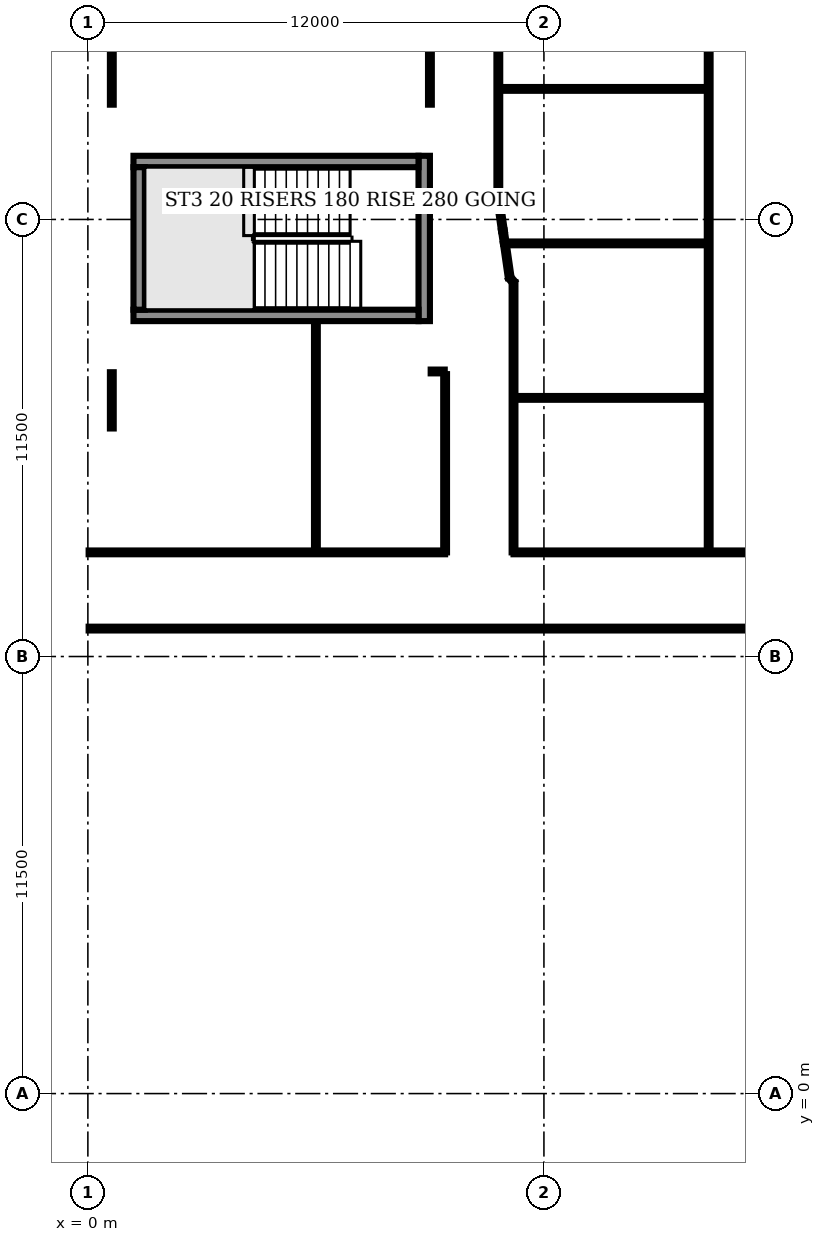
"""IFC4 building model, lengths in metres.
Left out: names, types, materials, properties, quantities, classifications, styles, units other than length and angle.
Written with IfcOpenShell. Run it as: python <this file> out.ifc"""

import sys

from ifc_helpers import new_model, si_unit, direction, frame, frame_2d, origin, origin_2d, place, context, subcontext, project, spatial, rectangle, i_section, extrude, element, fill, save


model = new_model("IFC4")
c1 = context("Model", 3, precision=1e-05, world=origin(), true_north=direction((0.0, 1.0)))
c2 = subcontext(c1, "Body", "Model", "MODEL_VIEW")
j1 = project(units=[si_unit("LENGTHUNIT", "METRE"), si_unit("PLANEANGLEUNIT", "RADIAN")], contexts=[c1])
p1 = place(None, origin())
s1 = spatial("IfcSite", under=j1, at=p1, CompositionType="ELEMENT")
p2 = place(p1, origin())
s2 = spatial("IfcBuilding", under=s1, at=p2, CompositionType="ELEMENT")
p3 = place(p2, frame((0.0, 0.0, 41.5)))
s3 = spatial("IfcBuildingStorey", under=s2, at=p3, CompositionType="ELEMENT", Elevation=41.5)
p4 = place(p3, frame((7.1, 7.1, 0.0), z_axis=(0.0, 0.0, 1.0), x_axis=(1.0, 0.0, 0.0)))
e1 = element("IfcColumn", 1, at=p4, inside=s3, PredefinedType="COLUMN", context=c2, shape_type="SweptSolid", body=[
    extrude(rectangle(XDim=2.2, YDim=2.2, at=origin_2d()), origin(), (0.0, 0.0, 1.0), 3.6),
])
for number, where, z_axis, x_axis in (
    (2, (6.694, 0.529, 0.0), (0.0, 0.0, 1.0), (-0.087, -0.996, 0.0)),
    (3, (0.66, 18.0, 0.0), (0.0, 0.0, 1.0), (-1.0, 0.0, 0.0)),
    (4, (2.332, 6.667, 0.0), (0.0, 0.0, 1.0), (-1.0, 0.0, 0.0)),
):
    element("IfcColumn", number, at=place(p3, frame(where, z_axis=z_axis, x_axis=x_axis)), inside=s3, PredefinedType="COLUMN", context=c2, shape_type="SweptSolid", body=[
        extrude(i_section(OverallWidth=0.302, OverallDepth=1.008, WebThickness=0.021, FlangeThickness=0.04, FilletRadius=0.03, at=origin_2d()), origin(), (0.0, 0.0, 1.0), 3.6),
    ])
for number, where, z_axis, x_axis in (
    (5, (12.0, 11.5, 0.0), (0.0, 0.0, 1.0), (1.0, 0.0, 0.0)),
    (6, (12.0, 23.0, 0.0), (0.0, 0.0, 1.0), (1.0, 0.0, 0.0)),
):
    element("IfcColumn", number, at=place(p3, frame(where, z_axis=z_axis, x_axis=x_axis)), inside=s3, PredefinedType="COLUMN", context=c2, shape_type="SweptSolid", body=[
        extrude(i_section(OverallWidth=0.305, OverallDepth=0.62, WebThickness=0.021, FlangeThickness=0.04, FilletRadius=0.027, at=origin_2d()), origin(), (0.0, 0.0, 1.0), 3.6),
    ])
p5 = place(p3, frame((5.835, -0.516, 0.0), z_axis=(0.0, 0.0, 1.0), x_axis=(0.996195, -0.087152, 0.0)))
e7 = element("IfcWall", 7, at=p5, inside=s3, PredefinedType="SOLIDWALL", context=c2, shape_type="SweptSolid", body=[
    extrude(rectangle(XDim=40.333, YDim=0.35, at=frame_2d((20.167, 0.0))), origin(), (0.0, 0.0, 1.0), 1.0),
])
p6 = place(p3, frame((-0.005, 41.83, 0.0), z_axis=(0.0, 0.0, 1.0), x_axis=(0.0, -1.0, 0.0)))
e8 = element("IfcWall", 8, at=p6, inside=s3, PredefinedType="SOLIDWALL", context=c2, shape_type="SweptSolid", body=[
    extrude(rectangle(XDim=36.01, YDim=0.35, at=frame_2d((18.005, 0.0))), origin(), (0.0, 0.0, 1.0), 1.0),
])
p7 = place(p3, frame((0.17, 5.995, 0.0), z_axis=(0.0, 0.0, 1.0), x_axis=(1.0, 0.0, 0.0)))
e9 = element("IfcWall", 9, at=p7, inside=s3, PredefinedType="SOLIDWALL", context=c2, shape_type="SweptSolid", body=[
    extrude(rectangle(XDim=2.011, YDim=0.35, at=frame_2d((1.005, 0.0))), origin(), (0.0, 0.0, 1.0), 1.0),
])
p8 = place(p3, frame((2.483, 5.995, 0.0), z_axis=(0.0, 0.0, 1.0), x_axis=(1.0, 0.0, 0.0)))
e10 = element("IfcWall", 10, at=p8, inside=s3, PredefinedType="SOLIDWALL", context=c2, shape_type="SweptSolid", body=[
    extrude(rectangle(XDim=3.517, YDim=0.35, at=frame_2d((1.759, 0.0))), origin(), (0.0, 0.0, 1.0), 1.0),
])
p9 = place(p3, frame((5.995, 5.82, 0.0), z_axis=(0.0, 0.0, 1.0), x_axis=(0.0, -1.0, 0.0)))
e11 = element("IfcWall", 11, at=p9, inside=s3, PredefinedType="SOLIDWALL", context=c2, shape_type="SweptSolid", body=[
    extrude(rectangle(XDim=6.161, YDim=0.35, at=frame_2d((3.081, 0.0))), origin(), (0.0, 0.0, 1.0), 1.0),
])
p10 = place(p3, frame((8.85, 20.325, 0.0), z_axis=(0.0, 0.0, 1.0), x_axis=(0.0, 1.0, 0.0)))
e12 = element("IfcWall", 12, at=p10, inside=s3, PredefinedType="SHEAR", context=c2, shape_type="SweptSolid", body=[
    extrude(rectangle(XDim=4.35, YDim=0.3, at=frame_2d((2.175, 0.0))), origin(), (0.0, 0.0, 1.0), 3.2),
])
p11 = place(p10, frame((1.575, 0.0, 0.0)))
e13 = element("IfcOpeningElement", 13, at=p11, cuts=e12, PredefinedType="OPENING", context=c2, shape_type="SweptSolid", body=[
    extrude(rectangle(XDim=1.2, YDim=2.1, at=frame_2d((0.6, 1.05))), frame((0.0, 0.16, 0.0), z_axis=(0.0, -1.0, 0.0), x_axis=(1.0, 0.0, 0.0)), (0.0, 0.0, 1.0), 0.32),
])
p12 = place(p3, frame((0.02, 12.235, 0.0), z_axis=(0.0, 0.0, 1.0), x_axis=(1.0, 0.0, 0.0)))
e14 = element("IfcWall", 14, at=p12, inside=s3, PredefinedType="PARTITIONING", context=c2, shape_type="SweptSolid", body=[
    extrude(rectangle(XDim=38.46, YDim=0.1, at=frame_2d((19.23, 0.0))), origin(), (0.0, 0.0, 1.0), 3.2),
])
p13 = place(p12, frame((2.405, 0.0, 0.0)))
e15 = element("IfcOpeningElement", 15, at=p13, cuts=e14, PredefinedType="OPENING", context=c2, shape_type="SweptSolid", body=[
    extrude(rectangle(XDim=1.0, YDim=2.1, at=frame_2d((0.5, 1.05))), frame((0.0, 0.06, 0.0), z_axis=(0.0, -1.0, 0.0), x_axis=(1.0, 0.0, 0.0)), (0.0, 0.0, 1.0), 0.12),
])
p14 = place(p12, frame((7.405, 0.0, 0.0)))
e16 = element("IfcOpeningElement", 16, at=p14, cuts=e14, PredefinedType="OPENING", context=c2, shape_type="SweptSolid", body=[
    extrude(rectangle(XDim=1.0, YDim=2.1, at=frame_2d((0.5, 1.05))), frame((0.0, 0.06, 0.0), z_axis=(0.0, -1.0, 0.0), x_axis=(1.0, 0.0, 0.0)), (0.0, 0.0, 1.0), 0.12),
])
p15 = place(p12, frame((13.405, 0.0, 0.0)))
e17 = element("IfcOpeningElement", 17, at=p15, cuts=e14, PredefinedType="OPENING", context=c2, shape_type="SweptSolid", body=[
    extrude(rectangle(XDim=1.0, YDim=2.1, at=frame_2d((0.5, 1.05))), frame((0.0, 0.06, 0.0), z_axis=(0.0, -1.0, 0.0), x_axis=(1.0, 0.0, 0.0)), (0.0, 0.0, 1.0), 0.12),
])
p16 = place(p12, frame((19.48, 0.0, 0.0)))
e18 = element("IfcOpeningElement", 18, at=p16, cuts=e14, PredefinedType="OPENING", context=c2, shape_type="SweptSolid", body=[
    extrude(rectangle(XDim=1.0, YDim=2.1, at=frame_2d((0.5, 1.05))), frame((0.0, 0.06, 0.0), z_axis=(0.0, -1.0, 0.0), x_axis=(1.0, 0.0, 0.0)), (0.0, 0.0, 1.0), 0.12),
])
p17 = place(p12, frame((22.205, 0.0, 0.0)))
e19 = element("IfcOpeningElement", 19, at=p17, cuts=e14, PredefinedType="OPENING", context=c2, shape_type="SweptSolid", body=[
    extrude(rectangle(XDim=1.0, YDim=2.1, at=frame_2d((0.5, 1.05))), frame((0.0, 0.06, 0.0), z_axis=(0.0, -1.0, 0.0), x_axis=(1.0, 0.0, 0.0)), (0.0, 0.0, 1.0), 0.12),
])
p18 = place(p12, frame((34.2, 0.0, 0.0)))
e20 = element("IfcOpeningElement", 20, at=p18, cuts=e14, PredefinedType="OPENING", context=c2, shape_type="SweptSolid", body=[
    extrude(rectangle(XDim=1.0, YDim=2.1, at=frame_2d((0.5, 1.05))), frame((0.0, 0.06, 0.0), z_axis=(0.0, -1.0, 0.0), x_axis=(1.0, 0.0, 0.0)), (0.0, 0.0, 1.0), 0.12),
])
p19 = place(p3, frame((0.02, 14.24, 0.0), z_axis=(0.0, 0.0, 1.0), x_axis=(1.0, 0.0, 0.0)))
e21 = element("IfcWall", 21, at=p19, inside=s3, PredefinedType="PARTITIONING", context=c2, shape_type="SweptSolid", body=[
    extrude(rectangle(XDim=9.38, YDim=0.1, at=frame_2d((4.69, 0.0))), origin(), (0.0, 0.0, 1.0), 3.2),
])
p20 = place(p19, frame((2.56, 0.0, 0.0)))
e22 = element("IfcOpeningElement", 22, at=p20, cuts=e21, PredefinedType="OPENING", context=c2, shape_type="SweptSolid", body=[
    extrude(rectangle(XDim=1.0, YDim=2.1, at=frame_2d((0.5, 1.05))), frame((0.0, 0.06, 0.0), z_axis=(0.0, -1.0, 0.0), x_axis=(1.0, 0.0, 0.0)), (0.0, 0.0, 1.0), 0.12),
])
p21 = place(p3, frame((0.63, 17.5, 0.0), z_axis=(0.0, 0.0, 1.0), x_axis=(0.0, 1.0, 0.0)))
e23 = element("IfcWall", 23, at=p21, inside=s3, PredefinedType="PARTITIONING", context=c2, shape_type="SweptSolid", body=[
    extrude(rectangle(XDim=1.48, YDim=0.1, at=frame_2d((0.74, 0.0))), origin(), (0.0, 0.0, 1.0), 2.58),
])
p22 = place(p3, frame((0.63, 26.02, 0.0), z_axis=(0.0, 0.0, 1.0), x_axis=(0.0, 1.0, 0.0)))
e24 = element("IfcWall", 24, at=p22, inside=s3, PredefinedType="PARTITIONING", context=c2, shape_type="SweptSolid", body=[
    extrude(rectangle(XDim=3.98, YDim=0.1, at=frame_2d((1.99, 0.0))), origin(), (0.0, 0.0, 1.0), 2.58),
])
p23 = place(p3, frame((6.0, 8.21, 0.0), z_axis=(0.0, 0.0, 1.0), x_axis=(0.0, 1.0, 0.0)))
e25 = element("IfcWall", 25, at=p23, inside=s3, PredefinedType="PARTITIONING", context=c2, shape_type="SweptSolid", body=[
    extrude(rectangle(XDim=4.025, YDim=0.1, at=frame_2d((2.013, 0.0))), origin(), (0.0, 0.0, 1.0), 3.2),
])
p24 = place(p3, frame((6.0, 14.24, 0.0), z_axis=(0.0, 0.0, 1.0), x_axis=(0.0, 1.0, 0.0)))
e26 = element("IfcWall", 26, at=p24, inside=s3, PredefinedType="PARTITIONING", context=c2, shape_type="SweptSolid", body=[
    extrude(rectangle(XDim=6.085, YDim=0.1, at=frame_2d((3.042, 0.0))), origin(), (0.0, 0.0, 1.0), 3.2),
])
p25 = place(p3, frame((9.0, 26.02, 0.0), z_axis=(0.0, 0.0, 1.0), x_axis=(0.0, 1.0, 0.0)))
e27 = element("IfcWall", 27, at=p25, inside=s3, PredefinedType="PARTITIONING", context=c2, shape_type="SweptSolid", body=[
    extrude(rectangle(XDim=7.96, YDim=0.1, at=frame_2d((3.98, 0.0))), origin(), (0.0, 0.0, 1.0), 3.2),
])
p26 = place(p25, frame((3.56, 0.0, 0.0)))
e28 = element("IfcOpeningElement", 28, at=p26, cuts=e27, PredefinedType="OPENING", context=c2, shape_type="SweptSolid", body=[
    extrude(rectangle(XDim=1.0, YDim=2.1, at=frame_2d((0.5, 1.05))), frame((0.0, 0.06, 0.0), z_axis=(0.0, -1.0, 0.0), x_axis=(1.0, 0.0, 0.0)), (0.0, 0.0, 1.0), 0.12),
])
p27 = place(p3, frame((9.02, 19.0, 0.0), z_axis=(0.0, 0.0, 1.0), x_axis=(1.0, 0.0, 0.0)))
e29 = element("IfcWall", 29, at=p27, inside=s3, PredefinedType="PARTITIONING", context=c2, shape_type="SweptSolid", body=[
    extrude(rectangle(XDim=0.37, YDim=0.1, at=frame_2d((0.185, 0.0))), origin(), (0.0, 0.0, 1.0), 3.2),
])
p28 = place(p3, frame((9.4, 14.24, 0.0), z_axis=(0.0, 0.0, 1.0), x_axis=(0.0, 1.0, 0.0)))
e30 = element("IfcWall", 30, at=p28, inside=s3, PredefinedType="PARTITIONING", context=c2, shape_type="SweptSolid", body=[
    extrude(rectangle(XDim=4.69, YDim=0.1, at=frame_2d((2.345, 0.0))), origin(), (0.0, 0.0, 1.0), 3.2),
])
p29 = place(p28, frame((0.14, 0.0, 0.0)))
e31 = element("IfcOpeningElement", 31, at=p29, cuts=e30, PredefinedType="OPENING", context=c2, shape_type="SweptSolid", body=[
    extrude(rectangle(XDim=1.0, YDim=2.1, at=frame_2d((0.5, 1.05))), frame((0.0, 0.06, 0.0), z_axis=(0.0, -1.0, 0.0), x_axis=(1.0, 0.0, 0.0)), (0.0, 0.0, 1.0), 0.12),
])
p30 = place(p3, frame((10.0, -0.855, 0.0), z_axis=(0.0, 0.0, 1.0), x_axis=(0.0, 1.0, 0.0)))
e32 = element("IfcWall", 32, at=p30, inside=s3, PredefinedType="PARTITIONING", context=c2, shape_type="SweptSolid", body=[
    extrude(rectangle(XDim=13.09, YDim=0.1, at=frame_2d((6.545, 0.0))), origin(), (0.0, 0.0, 1.0), 3.2),
])
p31 = place(p3, frame((10.8, 23.55, 0.0), z_axis=(0.0, 0.0, 1.0), x_axis=(0.0, 1.0, 0.0)))
e33 = element("IfcWall", 33, at=p31, inside=s3, PredefinedType="PARTITIONING", context=c2, shape_type="SweptSolid", body=[
    extrude(rectangle(XDim=6.95, YDim=0.1, at=frame_2d((3.475, 0.0))), origin(), (0.0, 0.0, 1.0), 3.2),
])
p32 = place(p31, frame((0.308, 0.0, 0.0)))
e34 = element("IfcOpeningElement", 34, at=p32, cuts=e33, PredefinedType="OPENING", context=c2, shape_type="SweptSolid", body=[
    extrude(rectangle(XDim=1.0, YDim=2.1, at=frame_2d((0.5, 1.05))), frame((0.0, 0.06, 0.0), z_axis=(0.0, -1.0, 0.0), x_axis=(1.0, 0.0, 0.0)), (0.0, 0.0, 1.0), 0.12),
])
p33 = place(p3, frame((10.8, 26.435, 0.0), z_axis=(0.0, 0.0, 1.0), x_axis=(1.0, 0.0, 0.0)))
e35 = element("IfcWall", 35, at=p33, inside=s3, PredefinedType="PARTITIONING", context=c2, shape_type="SweptSolid", body=[
    extrude(rectangle(XDim=5.535, YDim=0.1, at=frame_2d((2.768, 0.0))), origin(), (0.0, 0.0, 1.0), 3.2),
])
p34 = place(p3, frame((10.92, 22.705, 0.0), z_axis=(0.0, 0.0, 1.0), x_axis=(-0.14046, 0.990086, 0.0)))
e36 = element("IfcWall", 36, at=p34, inside=s3, PredefinedType="PARTITIONING", context=c2, shape_type="SweptSolid", body=[
    extrude(rectangle(XDim=0.854, YDim=0.1, at=frame_2d((0.427, 0.0))), origin(), (0.0, 0.0, 1.0), 3.2),
])
p35 = place(p3, frame((10.97, 22.37, 0.0), z_axis=(0.0, 0.0, 1.0), x_axis=(-0.147776, 0.989018, 0.0)))
e37 = element("IfcWall", 37, at=p35, inside=s3, PredefinedType="PARTITIONING", context=c2, shape_type="SweptSolid", body=[
    extrude(rectangle(XDim=0.339, YDim=0.1, at=frame_2d((0.169, 0.0))), origin(), (0.0, 0.0, 1.0), 3.2),
])
p36 = place(p3, frame((10.97, 22.37, 0.0), z_axis=(0.0, 0.0, 1.0), x_axis=(1.0, 0.0, 0.0)))
e38 = element("IfcWall", 38, at=p36, inside=s3, PredefinedType="PARTITIONING", context=c2, shape_type="SweptSolid", body=[
    extrude(rectangle(XDim=5.365, YDim=0.1, at=frame_2d((2.683, 0.0))), origin(), (0.0, 0.0, 1.0), 3.2),
])
p37 = place(p3, frame((11.1, 21.465, 0.0), z_axis=(0.0, 0.0, 1.0), x_axis=(-0.142318, 0.989818, 0.0)))
e39 = element("IfcWall", 39, at=p37, inside=s3, PredefinedType="PARTITIONING", context=c2, shape_type="SweptSolid", body=[
    extrude(rectangle(XDim=0.914, YDim=0.1, at=frame_2d((0.457, 0.0))), origin(), (0.0, 0.0, 1.0), 3.2),
])
p38 = place(p3, frame((11.2, 14.24, 0.0), z_axis=(0.0, 0.0, 1.0), x_axis=(0.0, 1.0, 0.0)))
e40 = element("IfcWall", 40, at=p38, inside=s3, PredefinedType="PARTITIONING", context=c2, shape_type="SweptSolid", body=[
    extrude(rectangle(XDim=7.11, YDim=0.1, at=frame_2d((3.555, 0.0))), origin(), (0.0, 0.0, 1.0), 3.2),
])
p39 = place(p38, frame((5.085, 0.0, 0.0)))
e41 = element("IfcOpeningElement", 41, at=p39, cuts=e40, PredefinedType="OPENING", context=c2, shape_type="SweptSolid", body=[
    extrude(rectangle(XDim=1.0, YDim=2.1, at=frame_2d((0.5, 1.05))), frame((0.0, 0.06, 0.0), z_axis=(0.0, -1.0, 0.0), x_axis=(1.0, 0.0, 0.0)), (0.0, 0.0, 1.0), 0.12),
])
p40 = place(p3, frame((11.2, 14.24, 0.0), z_axis=(0.0, 0.0, 1.0), x_axis=(1.0, 0.0, 0.0)))
e42 = element("IfcWall", 42, at=p40, inside=s3, PredefinedType="PARTITIONING", context=c2, shape_type="SweptSolid", body=[
    extrude(rectangle(XDim=51.635, YDim=0.1, at=frame_2d((25.817, 0.0))), origin(), (0.0, 0.0, 1.0), 3.2),
])
p41 = place(p40, frame((0.115, 0.0, 0.0)))
e43 = element("IfcOpeningElement", 43, at=p41, cuts=e42, PredefinedType="OPENING", context=c2, shape_type="SweptSolid", body=[
    extrude(rectangle(XDim=1.0, YDim=2.1, at=frame_2d((0.5, 1.05))), frame((0.0, 0.06, 0.0), z_axis=(0.0, -1.0, 0.0), x_axis=(1.0, 0.0, 0.0)), (0.0, 0.0, 1.0), 0.12),
])
p42 = place(p40, frame((6.635, 0.0, 0.0)))
e44 = element("IfcOpeningElement", 44, at=p42, cuts=e42, PredefinedType="OPENING", context=c2, shape_type="SweptSolid", body=[
    extrude(rectangle(XDim=1.0, YDim=2.1, at=frame_2d((0.5, 1.05))), frame((0.0, 0.06, 0.0), z_axis=(0.0, -1.0, 0.0), x_axis=(1.0, 0.0, 0.0)), (0.0, 0.0, 1.0), 0.12),
])
p43 = place(p40, frame((22.7, 0.0, 0.0)))
e45 = element("IfcOpeningElement", 45, at=p43, cuts=e42, PredefinedType="OPENING", context=c2, shape_type="SweptSolid", body=[
    extrude(rectangle(XDim=1.0, YDim=2.1, at=frame_2d((0.5, 1.05))), frame((0.0, 0.06, 0.0), z_axis=(0.0, -1.0, 0.0), x_axis=(1.0, 0.0, 0.0)), (0.0, 0.0, 1.0), 0.12),
])
p44 = place(p40, frame((27.865, 0.0, 0.0)))
e46 = element("IfcOpeningElement", 46, at=p44, cuts=e42, PredefinedType="OPENING", context=c2, shape_type="SweptSolid", body=[
    extrude(rectangle(XDim=1.0, YDim=2.1, at=frame_2d((0.5, 1.05))), frame((0.0, 0.06, 0.0), z_axis=(0.0, -1.0, 0.0), x_axis=(1.0, 0.0, 0.0)), (0.0, 0.0, 1.0), 0.12),
])
p45 = place(p40, frame((34.065, 0.0, 0.0)))
e47 = element("IfcOpeningElement", 47, at=p45, cuts=e42, PredefinedType="OPENING", context=c2, shape_type="SweptSolid", body=[
    extrude(rectangle(XDim=1.8, YDim=2.1, at=frame_2d((0.9, 1.05))), frame((0.0, 0.06, 0.0), z_axis=(0.0, -1.0, 0.0), x_axis=(1.0, 0.0, 0.0)), (0.0, 0.0, 1.0), 0.12),
])
p46 = place(p40, frame((41.765, 0.0, 0.0)))
e48 = element("IfcOpeningElement", 48, at=p46, cuts=e42, PredefinedType="OPENING", context=c2, shape_type="SweptSolid", body=[
    extrude(rectangle(XDim=1.8, YDim=2.1, at=frame_2d((0.9, 1.05))), frame((0.0, 0.06, 0.0), z_axis=(0.0, -1.0, 0.0), x_axis=(1.0, 0.0, 0.0)), (0.0, 0.0, 1.0), 0.12),
])
p47 = place(p3, frame((11.2, 18.305, 0.0), z_axis=(0.0, 0.0, 1.0), x_axis=(1.0, 0.0, 0.0)))
e49 = element("IfcWall", 49, at=p47, inside=s3, PredefinedType="PARTITIONING", context=c2, shape_type="SweptSolid", body=[
    extrude(rectangle(XDim=5.135, YDim=0.1, at=frame_2d((2.567, 0.0))), origin(), (0.0, 0.0, 1.0), 3.2),
])
p48 = place(p3, frame((11.2, 21.35, 0.0), z_axis=(0.0, 0.0, 1.0), x_axis=(-0.65566, 0.755051, 0.0)))
e50 = element("IfcWall", 50, at=p48, inside=s3, PredefinedType="PARTITIONING", context=c2, shape_type="SweptSolid", body=[
    extrude(rectangle(XDim=0.152, YDim=0.1, at=frame_2d((0.076, 0.0))), origin(), (0.0, 0.0, 1.0), 3.2),
])
p49 = place(p3, frame((16.335, 14.24, 0.0), z_axis=(0.0, 0.0, 1.0), x_axis=(0.0, 1.0, 0.0)))
e51 = element("IfcWall", 51, at=p49, inside=s3, PredefinedType="PARTITIONING", context=c2, shape_type="SweptSolid", body=[
    extrude(rectangle(XDim=16.26, YDim=0.1, at=frame_2d((8.13, 0.0))), origin(), (0.0, 0.0, 1.0), 3.2),
])
for number, where, z_axis, x_axis in (
    (52, (1.2, 20.475, 0.0), (0.0, 0.0, 1.0), (1.0, 0.0, 0.0)),
    (53, (1.2, 24.525, 0.0), (0.0, 0.0, 1.0), (1.0, 0.0, 0.0)),
):
    element("IfcWall", number, at=place(p3, frame(where, z_axis=z_axis, x_axis=x_axis)), inside=s3, PredefinedType="SHEAR", context=c2, shape_type="SweptSolid", body=[
        extrude(rectangle(XDim=7.5, YDim=0.3, at=frame_2d((3.75, 0.0))), origin(), (0.0, 0.0, 1.0), 3.2),
    ])
p50 = place(p3, frame((1.35, 20.625, 0.0), z_axis=(0.0, 0.0, 1.0), x_axis=(0.0, 1.0, 0.0)))
e54 = element("IfcWall", 54, at=p50, inside=s3, PredefinedType="SHEAR", context=c2, shape_type="SweptSolid", body=[
    extrude(rectangle(XDim=3.75, YDim=0.3, at=frame_2d((1.875, 0.0))), origin(), (0.0, 0.0, 1.0), 3.2),
])
p51 = place(p11, origin())
e55 = element("IfcDoor", 55, at=p51, inside=s3, OperationType="SINGLE_SWING_RIGHT", PredefinedType="DOOR", context=c2, shape_type="SweptSolid", body=[
    extrude(rectangle(XDim=1.2, YDim=2.1, at=frame_2d((0.6, 1.05))), frame((0.0, 0.025, 0.0), z_axis=(0.0, -1.0, 0.0), x_axis=(1.0, 0.0, 0.0)), (0.0, 0.0, 1.0), 0.05),
])
fill(e13, e55)
p52 = place(p13, origin())
e56 = element("IfcDoor", 56, at=p52, inside=s3, OperationType="SINGLE_SWING_LEFT", PredefinedType="DOOR", context=c2, shape_type="SweptSolid", body=[
    extrude(rectangle(XDim=1.0, YDim=2.1, at=frame_2d((0.5, 1.05))), frame((0.0, 0.025, 0.0), z_axis=(0.0, -1.0, 0.0), x_axis=(1.0, 0.0, 0.0)), (0.0, 0.0, 1.0), 0.05),
])
fill(e15, e56)
p53 = place(p14, origin())
e57 = element("IfcDoor", 57, at=p53, inside=s3, OperationType="SINGLE_SWING_LEFT", PredefinedType="DOOR", context=c2, shape_type="SweptSolid", body=[
    extrude(rectangle(XDim=1.0, YDim=2.1, at=frame_2d((0.5, 1.05))), frame((0.0, 0.025, 0.0), z_axis=(0.0, -1.0, 0.0), x_axis=(1.0, 0.0, 0.0)), (0.0, 0.0, 1.0), 0.05),
])
fill(e16, e57)
p54 = place(p15, origin())
e58 = element("IfcDoor", 58, at=p54, inside=s3, OperationType="SINGLE_SWING_LEFT", PredefinedType="DOOR", context=c2, shape_type="SweptSolid", body=[
    extrude(rectangle(XDim=1.0, YDim=2.1, at=frame_2d((0.5, 1.05))), frame((0.0, 0.025, 0.0), z_axis=(0.0, -1.0, 0.0), x_axis=(1.0, 0.0, 0.0)), (0.0, 0.0, 1.0), 0.05),
])
fill(e17, e58)
p55 = place(p20, origin())
e59 = element("IfcDoor", 59, at=p55, inside=s3, OperationType="SINGLE_SWING_LEFT", PredefinedType="DOOR", context=c2, shape_type="SweptSolid", body=[
    extrude(rectangle(XDim=1.0, YDim=2.1, at=frame_2d((0.5, 1.05))), frame((0.0, 0.025, 0.0), z_axis=(0.0, -1.0, 0.0), x_axis=(1.0, 0.0, 0.0)), (0.0, 0.0, 1.0), 0.05),
])
fill(e22, e59)
p56 = place(p41, origin())
e60 = element("IfcDoor", 60, at=p56, inside=s3, OperationType="SINGLE_SWING_LEFT", PredefinedType="DOOR", context=c2, shape_type="SweptSolid", body=[
    extrude(rectangle(XDim=1.0, YDim=2.1, at=frame_2d((0.5, 1.05))), frame((0.0, 0.025, 0.0), z_axis=(0.0, -1.0, 0.0), x_axis=(1.0, 0.0, 0.0)), (0.0, 0.0, 1.0), 0.05),
])
fill(e43, e60)
p57 = place(p29, origin())
e61 = element("IfcDoor", 61, at=p57, inside=s3, OperationType="SINGLE_SWING_LEFT", PredefinedType="DOOR", context=c2, shape_type="SweptSolid", body=[
    extrude(rectangle(XDim=1.0, YDim=2.1, at=frame_2d((0.5, 1.05))), frame((0.0, 0.025, 0.0), z_axis=(0.0, -1.0, 0.0), x_axis=(1.0, 0.0, 0.0)), (0.0, 0.0, 1.0), 0.05),
])
fill(e31, e61)
p58 = place(p39, origin())
e62 = element("IfcDoor", 62, at=p58, inside=s3, OperationType="SINGLE_SWING_RIGHT", PredefinedType="DOOR", context=c2, shape_type="SweptSolid", body=[
    extrude(rectangle(XDim=1.0, YDim=2.1, at=frame_2d((0.5, 1.05))), frame((0.0, 0.025, 0.0), z_axis=(0.0, -1.0, 0.0), x_axis=(1.0, 0.0, 0.0)), (0.0, 0.0, 1.0), 0.05),
])
fill(e41, e62)
p59 = place(p32, origin())
e63 = element("IfcDoor", 63, at=p59, inside=s3, OperationType="SINGLE_SWING_LEFT", PredefinedType="DOOR", context=c2, shape_type="SweptSolid", body=[
    extrude(rectangle(XDim=1.0, YDim=2.1, at=frame_2d((0.5, 1.05))), frame((0.0, 0.025, 0.0), z_axis=(0.0, -1.0, 0.0), x_axis=(1.0, 0.0, 0.0)), (0.0, 0.0, 1.0), 0.05),
])
fill(e34, e63)
save(model, sys.argv[1])
